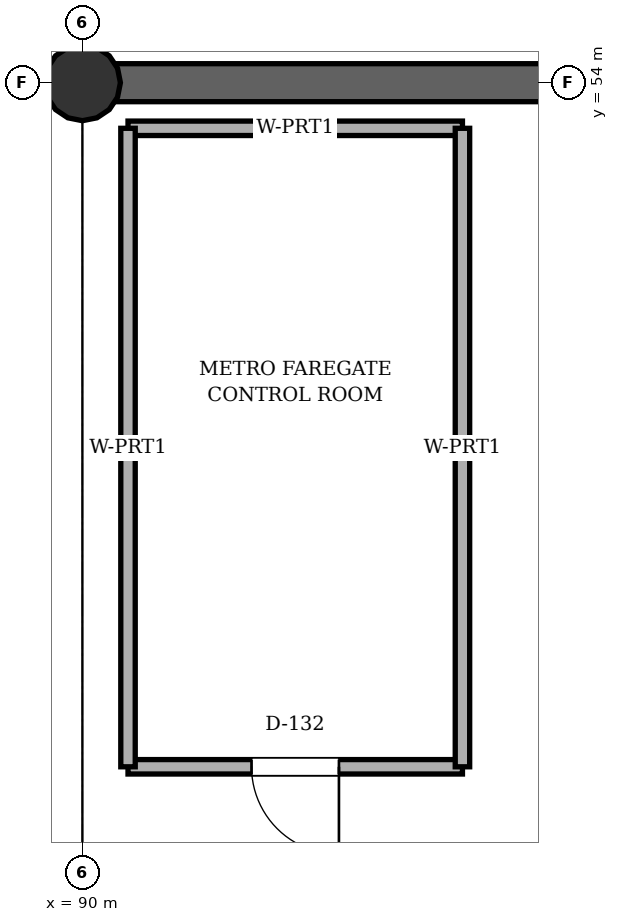
"""IFC4 building model, lengths in metres.
Left out: names, types, materials, properties, quantities, classifications, styles, units other than length and angle.
Written with IfcOpenShell. Run it as: python <this file> out.ifc"""

import sys

from ifc_helpers import new_model, si_unit, direction, frame, frame_2d, origin, origin_2d, place, context, subcontext, project, spatial, rectangle, circle, extrude, element, fill, save


model = new_model("IFC4")
c1 = context("Model", 3, precision=1e-05, world=origin(), true_north=direction((0.0, 1.0)))
c2 = subcontext(c1, "Body", "Model", "MODEL_VIEW")
j1 = project(units=[si_unit("LENGTHUNIT", "METRE"), si_unit("PLANEANGLEUNIT", "RADIAN")], contexts=[c1])
p1 = place(None, origin())
s1 = spatial("IfcSite", under=j1, at=p1, CompositionType="ELEMENT")
p2 = place(p1, origin())
s2 = spatial("IfcBuilding", under=s1, at=p2, CompositionType="ELEMENT")
p3 = place(p2, frame((0.0, 0.0, -5.4)))
s3 = spatial("IfcBuildingStorey", under=s2, at=p3, CompositionType="ELEMENT", Elevation=-5.4)
p4 = place(p3, frame((90.0, 54.0, 0.0), z_axis=(0.0, 0.0, 1.0), x_axis=(1.0, 0.0, 0.0)))
e1 = element("IfcColumn", 1, at=p4, inside=s3, PredefinedType="COLUMN", context=c2, shape_type="SweptSolid", body=[
    extrude(circle(Radius=0.5, at=origin_2d()), origin(), (0.0, 0.0, 1.0), 5.4),
])
p5 = place(p3, frame((90.0, 54.0, 0.0), z_axis=(0.0, 0.0, 1.0), x_axis=(1.0, 0.0, 0.0)))
e2 = element("IfcWall", 2, at=p5, inside=s3, PredefinedType="USERDEFINED", context=c2, shape_type="SweptSolid", body=[
    extrude(rectangle(XDim=46.0, YDim=0.5, at=frame_2d((23.0, 0.0))), origin(), (0.0, 0.0, 1.0), 5.05),
])
p6 = place(p3, frame((95.0, 45.0, 0.0), z_axis=(0.0, 0.0, 1.0), x_axis=(-1.0, 0.0, 0.0)))
e3 = element("IfcWall", 3, at=p6, inside=s3, PredefinedType="PARTITIONING", context=c2, shape_type="SweptSolid", body=[
    extrude(rectangle(XDim=4.4, YDim=0.19, at=frame_2d((2.2, 0.0))), origin(), (0.0, 0.0, 1.0), 4.4),
])
p7 = place(p6, frame((1.625, 0.0, 0.0)))
e4 = element("IfcOpeningElement", 4, at=p7, cuts=e3, PredefinedType="OPENING", context=c2, shape_type="SweptSolid", body=[
    extrude(rectangle(XDim=1.15, YDim=2.1, at=frame_2d((0.575, 1.05))), frame((0.0, 0.105, 0.0), z_axis=(0.0, -1.0, 0.0), x_axis=(1.0, 0.0, 0.0)), (0.0, 0.0, 1.0), 0.21),
])
p8 = place(p3, frame((90.6, 53.4, 0.0), z_axis=(0.0, 0.0, 1.0), x_axis=(1.0, 0.0, 0.0)))
e5 = element("IfcWall", 5, at=p8, inside=s3, PredefinedType="PARTITIONING", context=c2, shape_type="SweptSolid", body=[
    extrude(rectangle(XDim=4.4, YDim=0.19, at=frame_2d((2.2, 0.0))), origin(), (0.0, 0.0, 1.0), 4.295),
])
for number, where, z_axis, x_axis in (
    (6, (90.6, 45.0, 0.0), (0.0, 0.0, 1.0), (0.0, 1.0, 0.0)),
    (7, (95.0, 53.4, 0.0), (0.0, 0.0, 1.0), (0.0, -1.0, 0.0)),
):
    element("IfcWall", number, at=place(p3, frame(where, z_axis=z_axis, x_axis=x_axis)), inside=s3, PredefinedType="PARTITIONING", context=c2, shape_type="SweptSolid", body=[
        extrude(rectangle(XDim=8.4, YDim=0.19, at=frame_2d((4.2, 0.0))), origin(), (0.0, 0.0, 1.0), 4.295),
    ])
p9 = place(p7, origin())
e8 = element("IfcDoor", 8, at=p9, inside=s3, OperationType="SINGLE_SWING_LEFT", PredefinedType="DOOR", context=c2, shape_type="SweptSolid", body=[
    extrude(rectangle(XDim=1.15, YDim=2.1, at=frame_2d((0.575, 1.05))), frame((0.0, 0.025, 0.0), z_axis=(0.0, -1.0, 0.0), x_axis=(1.0, 0.0, 0.0)), (0.0, 0.0, 1.0), 0.05),
])
fill(e4, e8)
save(model, sys.argv[1])
